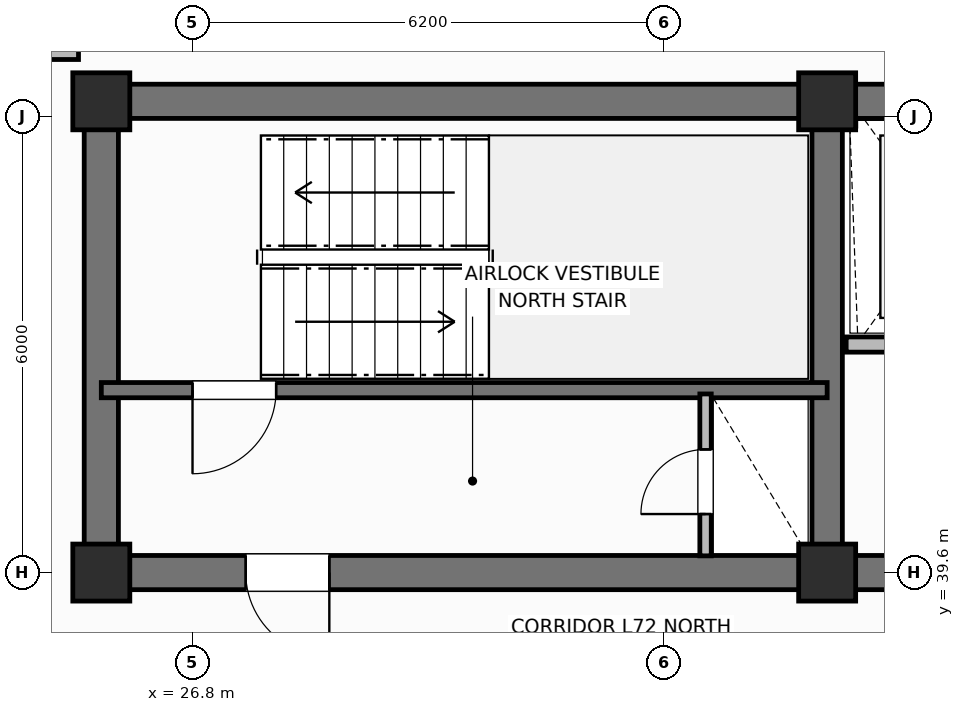
"""IFC4 building model, lengths in metres.
Left out: names, types, materials, properties, quantities, classifications, styles, units other than length and angle.
Written with IfcOpenShell. Run it as: python <this file> out.ifc"""

import sys

from ifc_helpers import new_model, si_unit, direction, frame, frame_2d, origin, origin_2d, place, context, subcontext, project, spatial, rectangle, extrude, element, fill, save


model = new_model("IFC4")
c1 = context("Model", 3, precision=1e-05, world=origin(), true_north=direction((0.0, 1.0)))
c2 = subcontext(c1, "Body", "Model", "MODEL_VIEW")
j1 = project(units=[si_unit("LENGTHUNIT", "METRE"), si_unit("PLANEANGLEUNIT", "RADIAN")], contexts=[c1])
p1 = place(None, origin())
s1 = spatial("IfcSite", under=j1, at=p1, CompositionType="ELEMENT")
p2 = place(p1, origin())
s2 = spatial("IfcBuilding", under=s1, at=p2, CompositionType="ELEMENT")
p3 = place(p2, frame((0.0, 0.0, 286.1)))
s3 = spatial("IfcBuildingStorey", under=s2, at=p3, CompositionType="ELEMENT", Elevation=286.1)
p4 = place(p3, frame((25.6, 45.8, 0.0), z_axis=(0.0, 0.0, 1.0), x_axis=(1.0, 0.0, 0.0)))
e1 = element("IfcWall", 1, at=p4, inside=s3, PredefinedType="SHEAR", context=c2, shape_type="SweptSolid", body=[
    extrude(rectangle(XDim=27.2, YDim=0.45, at=frame_2d((13.6, 0.0))), origin(), (0.0, 0.0, 1.0), 3.7),
])
p5 = place(p3, frame((25.6, 39.825, 0.0), z_axis=(0.0, 0.0, 1.0), x_axis=(0.0, 1.0, 0.0)))
e2 = element("IfcWall", 2, at=p5, inside=s3, PredefinedType="SHEAR", context=c2, shape_type="SweptSolid", body=[
    extrude(rectangle(XDim=5.75, YDim=0.45, at=frame_2d((2.875, 0.0))), origin(), (0.0, 0.0, 1.0), 3.7),
])
p6 = place(p3, frame((52.8, 39.6, 0.0), z_axis=(0.0, 0.0, 1.0), x_axis=(-1.0, 0.0, 0.0)))
e3 = element("IfcWall", 3, at=p6, inside=s3, PredefinedType="SHEAR", context=c2, shape_type="SweptSolid", body=[
    extrude(rectangle(XDim=27.2, YDim=0.45, at=frame_2d((13.6, 0.0))), origin(), (0.0, 0.0, 1.0), 3.7),
])
p7 = place(p6, frame((24.2, 0.0, 0.0)))
e4 = element("IfcOpeningElement", 4, at=p7, cuts=e3, PredefinedType="OPENING", context=c2, shape_type="SweptSolid", body=[
    extrude(rectangle(XDim=1.1, YDim=2.15, at=frame_2d((0.55, 1.075))), frame((0.0, 0.235, 0.0), z_axis=(0.0, -1.0, 0.0), x_axis=(1.0, 0.0, 0.0)), (0.0, 0.0, 1.0), 0.47),
])
p8 = place(p6, frame((15.1, 0.0, 0.0)))
e5 = element("IfcOpeningElement", 5, at=p8, cuts=e3, PredefinedType="OPENING", context=c2, shape_type="SweptSolid", body=[
    extrude(rectangle(XDim=1.2, YDim=2.15, at=frame_2d((0.6, 1.075))), frame((0.0, 0.235, 0.0), z_axis=(0.0, -1.0, 0.0), x_axis=(1.0, 0.0, 0.0)), (0.0, 0.0, 1.0), 0.47),
])
p9 = place(p6, frame((11.6, 0.0, 0.0)))
e6 = element("IfcOpeningElement", 6, at=p9, cuts=e3, PredefinedType="OPENING", context=c2, shape_type="SweptSolid", body=[
    extrude(rectangle(XDim=0.9, YDim=2.1, at=frame_2d((0.45, 1.05))), frame((0.0, 0.235, 0.0), z_axis=(0.0, -1.0, 0.0), x_axis=(1.0, 0.0, 0.0)), (0.0, 0.0, 1.0), 0.47),
])
p10 = place(p6, frame((7.35, 0.0, 0.0)))
e7 = element("IfcOpeningElement", 7, at=p10, cuts=e3, PredefinedType="OPENING", context=c2, shape_type="SweptSolid", body=[
    extrude(rectangle(XDim=0.85, YDim=2.1, at=frame_2d((0.425, 1.05))), frame((0.0, 0.235, 0.0), z_axis=(0.0, -1.0, 0.0), x_axis=(1.0, 0.0, 0.0)), (0.0, 0.0, 1.0), 0.47),
])
p11 = place(p6, frame((4.2, 0.0, 0.0)))
e8 = element("IfcOpeningElement", 8, at=p11, cuts=e3, PredefinedType="OPENING", context=c2, shape_type="SweptSolid", body=[
    extrude(rectangle(XDim=1.3, YDim=2.2, at=frame_2d((0.65, 1.1))), frame((0.0, 0.235, 0.0), z_axis=(0.0, -1.0, 0.0), x_axis=(1.0, 0.0, 0.0)), (0.0, 0.0, 1.0), 0.47),
])
p12 = place(p3, frame((35.15, 39.825, 0.0), z_axis=(0.0, 0.0, 1.0), x_axis=(0.0, 1.0, 0.0)))
e9 = element("IfcWall", 9, at=p12, inside=s3, PredefinedType="SHEAR", context=c2, shape_type="SweptSolid", body=[
    extrude(rectangle(XDim=5.75, YDim=0.4, at=frame_2d((2.875, 0.0))), origin(), (0.0, 0.0, 1.0), 3.7),
])
for number, where, z_axis, x_axis in (
    (10, (25.6, 39.6, 0.0), (0.0, 0.0, 1.0), (1.0, 0.0, 0.0)),
    (11, (25.6, 45.8, 0.0), (0.0, 0.0, 1.0), (1.0, 0.0, 0.0)),
    (12, (35.15, 39.6, 0.0), (0.0, 0.0, 1.0), (1.0, 0.0, 0.0)),
    (13, (35.15, 45.8, 0.0), (0.0, 0.0, 1.0), (1.0, 0.0, 0.0)),
):
    element("IfcColumn", number, at=place(p3, frame(where, z_axis=z_axis, x_axis=x_axis)), inside=s3, PredefinedType="COLUMN", context=c2, shape_type="SweptSolid", body=[
        extrude(rectangle(XDim=0.75, YDim=0.75, at=origin_2d()), origin(), (0.0, 0.0, 1.0), 3.7),
    ])
p13 = place(p3, frame((35.15, 42.0, 0.0), z_axis=(0.0, 0.0, 1.0), x_axis=(-1.0, 0.0, 0.0)))
e14 = element("IfcWall", 14, at=p13, inside=s3, PredefinedType="SHEAR", context=c2, shape_type="SweptSolid", body=[
    extrude(rectangle(XDim=9.55, YDim=0.2, at=frame_2d((4.775, 0.0))), origin(), (0.0, 0.0, 1.0), 3.7),
])
p14 = place(p13, frame((7.25, 0.0, 0.0)))
e15 = element("IfcOpeningElement", 15, at=p14, cuts=e14, PredefinedType="OPENING", context=c2, shape_type="SweptSolid", body=[
    extrude(rectangle(XDim=1.1, YDim=2.15, at=frame_2d((0.55, 1.075))), frame((0.0, 0.11, 0.0), z_axis=(0.0, -1.0, 0.0), x_axis=(1.0, 0.0, 0.0)), (0.0, 0.0, 1.0), 0.22),
])
p15 = place(p3, frame((33.55, 39.82, 0.0), z_axis=(0.0, 0.0, 1.0), x_axis=(0.0, 1.0, 0.0)))
e16 = element("IfcWall", 16, at=p15, inside=s3, PredefinedType="PARTITIONING", context=c2, shape_type="SweptSolid", body=[
    extrude(rectangle(XDim=2.13, YDim=0.15, at=frame_2d((1.065, 0.0))), origin(), (0.0, 0.0, 1.0), 2.56),
])
p16 = place(p15, frame((0.55, 0.0, 0.0)))
e17 = element("IfcOpeningElement", 17, at=p16, cuts=e16, PredefinedType="OPENING", context=c2, shape_type="SweptSolid", body=[
    extrude(rectangle(XDim=0.85, YDim=2.05, at=frame_2d((0.425, 1.025))), frame((0.0, 0.085, 0.0), z_axis=(0.0, -1.0, 0.0), x_axis=(1.0, 0.0, 0.0)), (0.0, 0.0, 1.0), 0.17),
])
p17 = place(p3, frame((37.95, 42.6, 0.0), z_axis=(0.0, 0.0, 1.0), x_axis=(-1.0, 0.0, 0.0)))
e18 = element("IfcWall", 18, at=p17, inside=s3, PredefinedType="PARTITIONING", context=c2, shape_type="SweptSolid", body=[
    extrude(rectangle(XDim=2.55, YDim=0.2, at=frame_2d((1.275, 0.0))), origin(), (0.0, 0.0, 1.0), 2.33),
])
p18 = place(p17, frame((0.75, 0.0, 0.0)))
e19 = element("IfcOpeningElement", 19, at=p18, cuts=e18, PredefinedType="OPENING", context=c2, shape_type="SweptSolid", body=[
    extrude(rectangle(XDim=1.1, YDim=2.15, at=frame_2d((0.55, 1.075))), frame((0.0, 0.11, 0.0), z_axis=(0.0, -1.0, 0.0), x_axis=(1.0, 0.0, 0.0)), (0.0, 0.0, 1.0), 0.22),
])
p19 = place(p3, frame((21.546, 46.45, 0.0), z_axis=(0.0, 0.0, 1.0), x_axis=(1.0, 0.0, 0.0)))
e20 = element("IfcWall", 20, at=p19, inside=s3, PredefinedType="PARTITIONING", context=c2, shape_type="SweptSolid", body=[
    extrude(rectangle(XDim=3.754, YDim=0.2, at=frame_2d((1.877, 0.0))), origin(), (0.0, 0.0, 1.0), 2.56),
])
p20 = place(p14, origin())
e21 = element("IfcDoor", 21, at=p20, inside=s3, OperationType="SINGLE_SWING_RIGHT", PredefinedType="DOOR", context=c2, shape_type="SweptSolid", body=[
    extrude(rectangle(XDim=1.1, YDim=2.15, at=frame_2d((0.55, 1.075))), frame((0.0, 0.025, 0.0), z_axis=(0.0, -1.0, 0.0), x_axis=(1.0, 0.0, 0.0)), (0.0, 0.0, 1.0), 0.05),
])
fill(e15, e21)
p21 = place(p16, origin())
e22 = element("IfcDoor", 22, at=p21, inside=s3, OperationType="SINGLE_SWING_LEFT", PredefinedType="TRAPDOOR", context=c2, shape_type="SweptSolid", body=[
    extrude(rectangle(XDim=0.85, YDim=2.05, at=frame_2d((0.425, 1.025))), frame((0.0, 0.025, 0.0), z_axis=(0.0, -1.0, 0.0), x_axis=(1.0, 0.0, 0.0)), (0.0, 0.0, 1.0), 0.05),
])
fill(e17, e22)
p22 = place(p7, origin())
e23 = element("IfcDoor", 23, at=p22, inside=s3, OperationType="SINGLE_SWING_LEFT", PredefinedType="DOOR", context=c2, shape_type="SweptSolid", body=[
    extrude(rectangle(XDim=1.1, YDim=2.15, at=frame_2d((0.55, 1.075))), frame((0.0, 0.025, 0.0), z_axis=(0.0, -1.0, 0.0), x_axis=(1.0, 0.0, 0.0)), (0.0, 0.0, 1.0), 0.05),
])
fill(e4, e23)
save(model, sys.argv[1])
